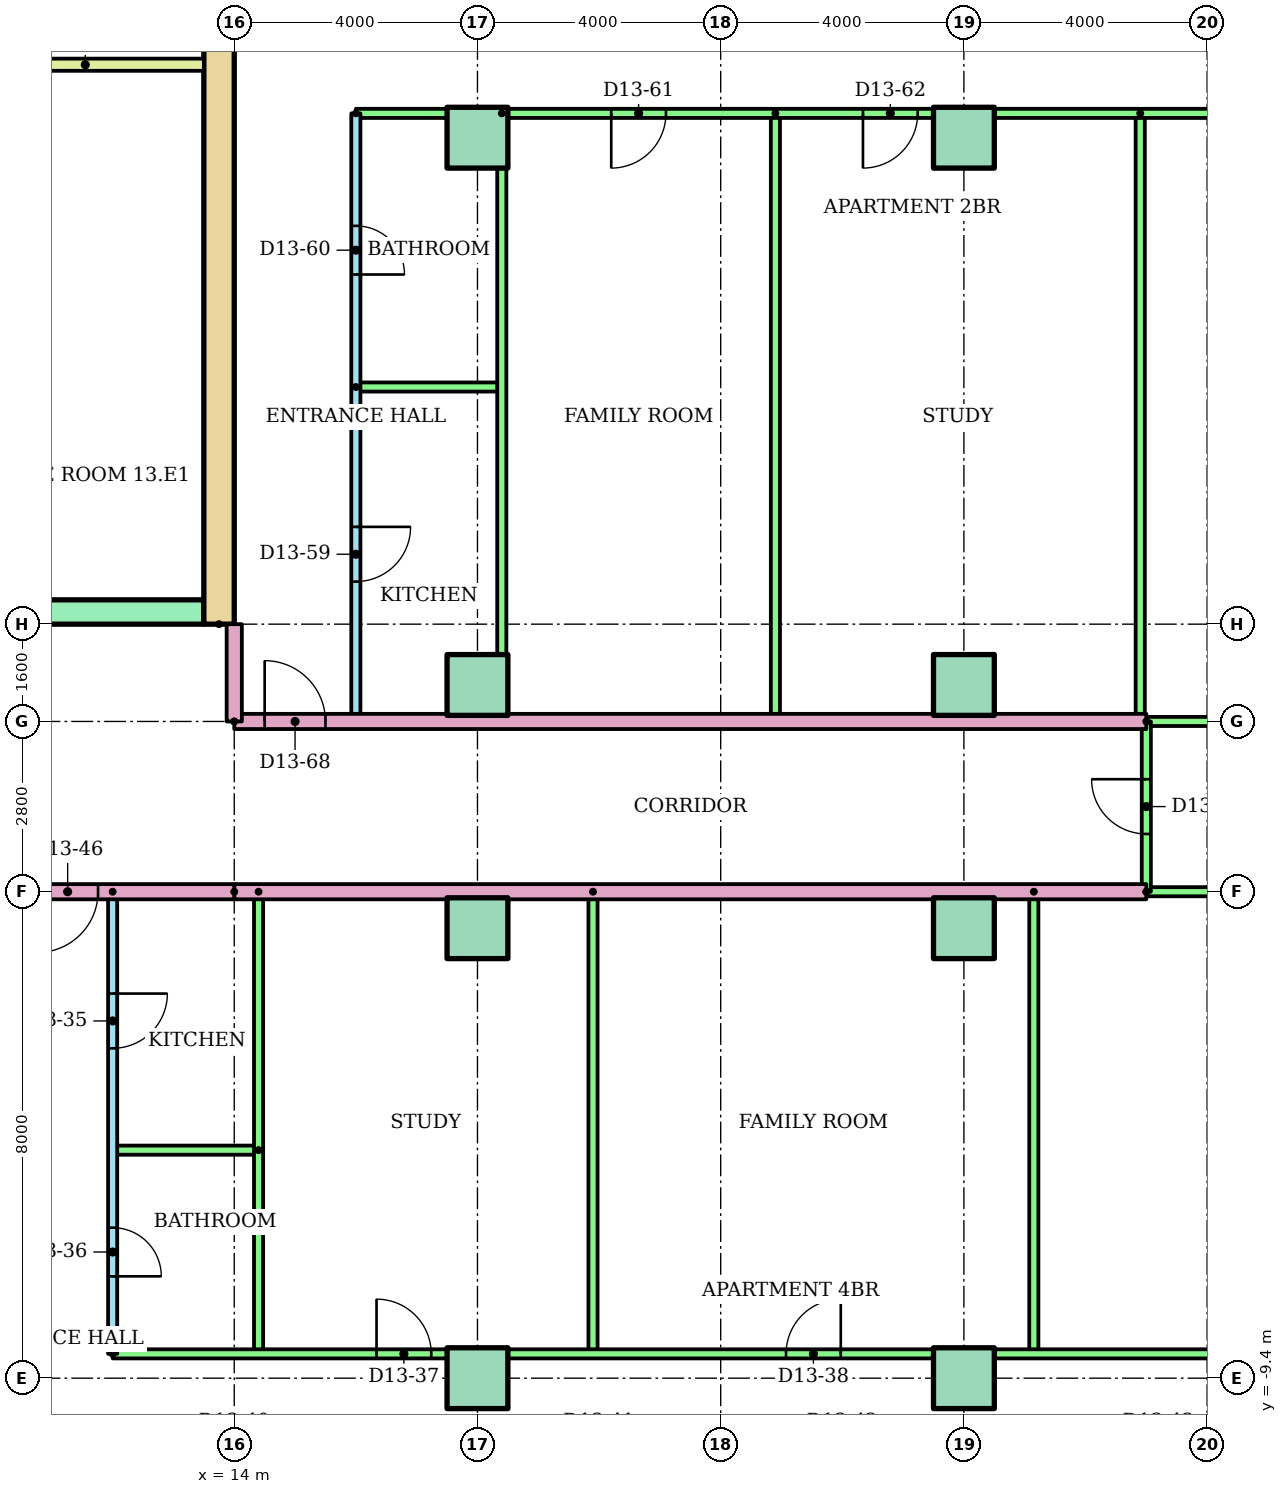
"""IFC4 building model, lengths in metres.
Left out: names, types, materials, properties, quantities, classifications, styles, units other than length and angle.
Written with IfcOpenShell. Run it as: python <this file> out.ifc"""

import sys

from ifc_helpers import new_model, si_unit, direction, frame, frame_2d, origin, origin_2d, place, context, subcontext, project, spatial, rectangle, extrude, element, fill, save


model = new_model("IFC4")
c1 = context("Model", 3, precision=1e-05, world=origin(), true_north=direction((0.0, 1.0)))
c2 = subcontext(c1, "Body", "Model", "MODEL_VIEW")
j1 = project(units=[si_unit("LENGTHUNIT", "METRE"), si_unit("PLANEANGLEUNIT", "RADIAN")], contexts=[c1])
p1 = place(None, origin())
s1 = spatial("IfcSite", under=j1, at=p1, CompositionType="ELEMENT")
p2 = place(p1, origin())
s2 = spatial("IfcBuilding", under=s1, at=p2, CompositionType="ELEMENT")
p3 = place(p2, frame((0.0, 0.0, 51.2)))
s3 = spatial("IfcBuildingStorey", under=s2, at=p3, CompositionType="ELEMENT", Elevation=51.2)
for number, where in (
    (1, (18.0, -9.4, 0.0)),
    (2, (26.0, -9.4, 0.0)),
    (3, (18.0, -2.0, 0.0)),
    (4, (26.0, -2.0, 0.0)),
    (5, (18.0, 2.0, 0.0)),
    (6, (26.0, 2.0, 0.0)),
    (7, (18.0, 11.0, 0.0)),
    (8, (26.0, 11.0, 0.0)),
):
    element("IfcColumn", number, at=place(p3, frame(where)), inside=s3, PredefinedType="COLUMN", context=c2, shape_type="SweptSolid", body=[
        extrude(rectangle(XDim=1.0, YDim=1.0, at=origin_2d()), origin(), (0.0, 0.0, 1.0), 3.2),
    ])
p4 = place(p3, frame((13.75, 3.0, 0.0), z_axis=(0.0, 0.0, 1.0), x_axis=(0.0, 1.0, 0.0)))
e9 = element("IfcWall", 9, at=p4, inside=s3, PredefinedType="SHEAR", context=c2, shape_type="SweptSolid", body=[
    extrude(rectangle(XDim=17.0, YDim=0.5, at=frame_2d((8.5, 0.0))), origin(), (0.0, 0.0, 1.0), 2.92),
])
p5 = place(p3, frame((-13.5, 3.2, 0.0)))
e10 = element("IfcWall", 10, at=p5, inside=s3, PredefinedType="SHEAR", context=c2, shape_type="SweptSolid", body=[
    extrude(rectangle(XDim=27.0, YDim=0.4, at=frame_2d((13.5, 0.0))), origin(), (0.0, 0.0, 1.0), 2.92),
])
p6 = place(p5, frame((6.861, 0.0, 0.0)))
e11 = element("IfcOpeningElement", 11, at=p6, cuts=e10, PredefinedType="OPENING", context=c2, shape_type="SweptSolid", body=[
    extrude(rectangle(XDim=1.1, YDim=2.1, at=frame_2d((0.55, 1.05))), frame((0.0, 0.21, 0.0), z_axis=(0.0, -1.0, 0.0), x_axis=(1.0, 0.0, 0.0)), (0.0, 0.0, 1.0), 0.42),
])
p7 = place(p5, frame((9.906, 0.0, 0.0)))
e12 = element("IfcOpeningElement", 12, at=p7, cuts=e10, PredefinedType="OPENING", context=c2, shape_type="SweptSolid", body=[
    extrude(rectangle(XDim=1.1, YDim=2.1, at=frame_2d((0.55, 1.05))), frame((0.0, 0.21, 0.0), z_axis=(0.0, -1.0, 0.0), x_axis=(1.0, 0.0, 0.0)), (0.0, 0.0, 1.0), 0.42),
])
p8 = place(p5, frame((15.994, 0.0, 0.0)))
e13 = element("IfcOpeningElement", 13, at=p8, cuts=e10, PredefinedType="OPENING", context=c2, shape_type="SweptSolid", body=[
    extrude(rectangle(XDim=1.1, YDim=2.1, at=frame_2d((0.55, 1.05))), frame((0.0, 0.21, 0.0), z_axis=(0.0, -1.0, 0.0), x_axis=(1.0, 0.0, 0.0)), (0.0, 0.0, 1.0), 0.42),
])
p9 = place(p5, frame((19.039, 0.0, 0.0)))
e14 = element("IfcOpeningElement", 14, at=p9, cuts=e10, PredefinedType="OPENING", context=c2, shape_type="SweptSolid", body=[
    extrude(rectangle(XDim=1.1, YDim=2.1, at=frame_2d((0.55, 1.05))), frame((0.0, 0.21, 0.0), z_axis=(0.0, -1.0, 0.0), x_axis=(1.0, 0.0, 0.0)), (0.0, 0.0, 1.0), 0.42),
])
p10 = place(p5, frame((12.6, 0.0, 0.0)))
e15 = element("IfcOpeningElement", 15, at=p10, cuts=e10, PredefinedType="OPENING", context=c2, shape_type="SweptSolid", body=[
    extrude(rectangle(XDim=1.8, YDim=2.1, at=frame_2d((0.9, 1.05))), frame((0.0, 0.21, 0.0), z_axis=(0.0, -1.0, 0.0), x_axis=(1.0, 0.0, 0.0)), (0.0, 0.0, 1.0), 0.42),
])
p11 = place(p3, frame((9.6, 12.2, 0.0)))
e16 = element("IfcWall", 16, at=p11, inside=s3, PredefinedType="PARTITIONING", context=c2, shape_type="SweptSolid", body=[
    extrude(rectangle(XDim=3.9, YDim=0.2, at=frame_2d((1.95, 0.0))), origin(), (0.0, 0.0, 1.0), 2.92),
])
p12 = place(p3, frame((12.0, -1.4, 0.0), z_axis=(0.0, 0.0, 1.0), x_axis=(0.0, -1.0, 0.0)))
e17 = element("IfcWall", 17, at=p12, inside=s3, PredefinedType="PARTITIONING", context=c2, shape_type="SweptSolid", body=[
    extrude(rectangle(XDim=7.6, YDim=0.15, at=frame_2d((3.8, 0.0))), origin(), (0.0, 0.0, 1.0), 2.4),
])
p13 = place(p12, frame((1.675, 0.0, 0.0)))
e18 = element("IfcOpeningElement", 18, at=p13, cuts=e17, PredefinedType="OPENING", context=c2, shape_type="SweptSolid", body=[
    extrude(rectangle(XDim=0.9, YDim=2.1, at=frame_2d((0.45, 1.05))), frame((0.0, 0.085, 0.0), z_axis=(0.0, -1.0, 0.0), x_axis=(1.0, 0.0, 0.0)), (0.0, 0.0, 1.0), 0.17),
])
p14 = place(p12, frame((5.525, 0.0, 0.0)))
e19 = element("IfcOpeningElement", 19, at=p14, cuts=e17, PredefinedType="OPENING", context=c2, shape_type="SweptSolid", body=[
    extrude(rectangle(XDim=0.8, YDim=2.1, at=frame_2d((0.4, 1.05))), frame((0.0, 0.085, 0.0), z_axis=(0.0, -1.0, 0.0), x_axis=(1.0, 0.0, 0.0)), (0.0, 0.0, 1.0), 0.17),
])
p15 = place(p3, frame((14.4, -5.65, 0.0), z_axis=(0.0, 0.0, 1.0), x_axis=(-1.0, 0.0, 0.0)))
e20 = element("IfcWall", 20, at=p15, inside=s3, PredefinedType="PARTITIONING", context=c2, shape_type="SweptSolid", body=[
    extrude(rectangle(XDim=2.4, YDim=0.15, at=frame_2d((1.2, 0.0))), origin(), (0.0, 0.0, 1.0), 2.4),
])
for number, where, z_axis, x_axis in (
    (21, (14.4, -1.4, 0.0), (0.0, 0.0, 1.0), (0.0, -1.0, 0.0)),
    (22, (19.9, -1.4, 0.0), (0.0, 0.0, 1.0), (0.0, -1.0, 0.0)),
    (23, (27.15, -1.4, 0.0), (0.0, 0.0, 1.0), (0.0, -1.0, 0.0)),
):
    element("IfcWall", number, at=place(p3, frame(where, z_axis=z_axis, x_axis=x_axis)), inside=s3, PredefinedType="PARTITIONING", context=c2, shape_type="SweptSolid", body=[
        extrude(rectangle(XDim=7.6, YDim=0.15, at=frame_2d((3.8, 0.0))), origin(), (0.0, 0.0, 1.0), 2.4),
    ])
p16 = place(p3, frame((12.0, -9.0, 0.0)))
e24 = element("IfcWall", 24, at=p16, inside=s3, PredefinedType="PARTITIONING", context=c2, shape_type="SweptSolid", body=[
    extrude(rectangle(XDim=24.52, YDim=0.15, at=frame_2d((12.26, 0.0))), origin(), (0.0, 0.0, 1.0), 2.4),
])
p17 = place(p16, frame((4.34, 0.0, 0.0)))
e25 = element("IfcOpeningElement", 25, at=p17, cuts=e24, PredefinedType="OPENING", context=c2, shape_type="SweptSolid", body=[
    extrude(rectangle(XDim=0.9, YDim=2.1, at=frame_2d((0.45, 1.05))), frame((0.0, 0.085, 0.0), z_axis=(0.0, -1.0, 0.0), x_axis=(1.0, 0.0, 0.0)), (0.0, 0.0, 1.0), 0.17),
])
p18 = place(p16, frame((11.075, 0.0, 0.0)))
e26 = element("IfcOpeningElement", 26, at=p18, cuts=e24, PredefinedType="OPENING", context=c2, shape_type="SweptSolid", body=[
    extrude(rectangle(XDim=0.9, YDim=2.1, at=frame_2d((0.45, 1.05))), frame((0.0, 0.085, 0.0), z_axis=(0.0, -1.0, 0.0), x_axis=(1.0, 0.0, 0.0)), (0.0, 0.0, 1.0), 0.17),
])
p19 = place(p16, frame((19.275, 0.0, 0.0)))
e27 = element("IfcOpeningElement", 27, at=p19, cuts=e24, PredefinedType="OPENING", context=c2, shape_type="SweptSolid", body=[
    extrude(rectangle(XDim=0.9, YDim=2.1, at=frame_2d((0.45, 1.05))), frame((0.0, 0.085, 0.0), z_axis=(0.0, -1.0, 0.0), x_axis=(1.0, 0.0, 0.0)), (0.0, 0.0, 1.0), 0.17),
])
p20 = place(p3, frame((29.0, -1.4, 0.0), z_axis=(0.0, 0.0, 1.0), x_axis=(-1.0, 0.0, 0.0)))
e28 = element("IfcWall", 28, at=p20, inside=s3, PredefinedType="PARTITIONING", context=c2, shape_type="SweptSolid", body=[
    extrude(rectangle(XDim=15.0, YDim=0.25, at=frame_2d((7.5, 0.0))), origin(), (0.0, 0.0, 1.0), 2.4),
])
p21 = place(p3, frame((36.52, -1.4, 0.0), z_axis=(0.0, 0.0, 1.0), x_axis=(-1.0, 0.0, 0.0)))
e29 = element("IfcWall", 29, at=p21, inside=s3, PredefinedType="PARTITIONING", context=c2, shape_type="SweptSolid", body=[
    extrude(rectangle(XDim=7.52, YDim=0.15, at=frame_2d((3.76, 0.0))), origin(), (0.0, 0.0, 1.0), 2.4),
])
p22 = place(p3, frame((16.0, 11.4, 0.0), z_axis=(0.0, 0.0, 1.0), x_axis=(0.0, -1.0, 0.0)))
e30 = element("IfcWall", 30, at=p22, inside=s3, PredefinedType="PARTITIONING", context=c2, shape_type="SweptSolid", body=[
    extrude(rectangle(XDim=10.0, YDim=0.15, at=frame_2d((5.0, 0.0))), origin(), (0.0, 0.0, 1.0), 2.4),
])
p23 = place(p22, frame((6.8, 0.0, 0.0)))
e31 = element("IfcOpeningElement", 31, at=p23, cuts=e30, PredefinedType="OPENING", context=c2, shape_type="SweptSolid", body=[
    extrude(rectangle(XDim=0.9, YDim=2.1, at=frame_2d((0.45, 1.05))), frame((0.0, 0.085, 0.0), z_axis=(0.0, -1.0, 0.0), x_axis=(1.0, 0.0, 0.0)), (0.0, 0.0, 1.0), 0.17),
])
p24 = place(p22, frame((1.85, 0.0, 0.0)))
e32 = element("IfcOpeningElement", 32, at=p24, cuts=e30, PredefinedType="OPENING", context=c2, shape_type="SweptSolid", body=[
    extrude(rectangle(XDim=0.8, YDim=2.1, at=frame_2d((0.4, 1.05))), frame((0.0, 0.085, 0.0), z_axis=(0.0, -1.0, 0.0), x_axis=(1.0, 0.0, 0.0)), (0.0, 0.0, 1.0), 0.17),
])
p25 = place(p3, frame((16.0, 6.9, 0.0)))
e33 = element("IfcWall", 33, at=p25, inside=s3, PredefinedType="PARTITIONING", context=c2, shape_type="SweptSolid", body=[
    extrude(rectangle(XDim=2.4, YDim=0.15, at=frame_2d((1.2, 0.0))), origin(), (0.0, 0.0, 1.0), 2.4),
])
for number, where, z_axis, x_axis in (
    (34, (18.4, 11.4, 0.0), (0.0, 0.0, 1.0), (0.0, -1.0, 0.0)),
    (35, (22.9, 11.4, 0.0), (0.0, 0.0, 1.0), (0.0, -1.0, 0.0)),
    (36, (28.9, 11.4, 0.0), (0.0, 0.0, 1.0), (0.0, -1.0, 0.0)),
):
    element("IfcWall", number, at=place(p3, frame(where, z_axis=z_axis, x_axis=x_axis)), inside=s3, PredefinedType="PARTITIONING", context=c2, shape_type="SweptSolid", body=[
        extrude(rectangle(XDim=10.0, YDim=0.15, at=frame_2d((5.0, 0.0))), origin(), (0.0, 0.0, 1.0), 2.4),
    ])
p26 = place(p3, frame((36.52, 11.4, 0.0), z_axis=(0.0, 0.0, 1.0), x_axis=(-1.0, 0.0, 0.0)))
e37 = element("IfcWall", 37, at=p26, inside=s3, PredefinedType="PARTITIONING", context=c2, shape_type="SweptSolid", body=[
    extrude(rectangle(XDim=20.52, YDim=0.15, at=frame_2d((10.26, 0.0))), origin(), (0.0, 0.0, 1.0), 2.4),
])
p27 = place(p26, frame((15.42, 0.0, 0.0)))
e38 = element("IfcOpeningElement", 38, at=p27, cuts=e37, PredefinedType="OPENING", context=c2, shape_type="SweptSolid", body=[
    extrude(rectangle(XDim=0.9, YDim=2.1, at=frame_2d((0.45, 1.05))), frame((0.0, 0.085, 0.0), z_axis=(0.0, -1.0, 0.0), x_axis=(1.0, 0.0, 0.0)), (0.0, 0.0, 1.0), 0.17),
])
p28 = place(p26, frame((11.28, 0.0, 0.0)))
e39 = element("IfcOpeningElement", 39, at=p28, cuts=e37, PredefinedType="OPENING", context=c2, shape_type="SweptSolid", body=[
    extrude(rectangle(XDim=0.9, YDim=2.1, at=frame_2d((0.45, 1.05))), frame((0.0, 0.085, 0.0), z_axis=(0.0, -1.0, 0.0), x_axis=(1.0, 0.0, 0.0)), (0.0, 0.0, 1.0), 0.17),
])
p29 = place(p26, frame((3.47, 0.0, 0.0)))
e40 = element("IfcOpeningElement", 40, at=p29, cuts=e37, PredefinedType="OPENING", context=c2, shape_type="SweptSolid", body=[
    extrude(rectangle(XDim=0.9, YDim=2.1, at=frame_2d((0.45, 1.05))), frame((0.0, 0.085, 0.0), z_axis=(0.0, -1.0, 0.0), x_axis=(1.0, 0.0, 0.0)), (0.0, 0.0, 1.0), 0.17),
])
p30 = place(p3, frame((14.0, 1.4, 0.0)))
e41 = element("IfcWall", 41, at=p30, inside=s3, PredefinedType="PARTITIONING", context=c2, shape_type="SweptSolid", body=[
    extrude(rectangle(XDim=15.0, YDim=0.25, at=frame_2d((7.5, 0.0))), origin(), (0.0, 0.0, 1.0), 2.4),
])
p31 = place(p30, frame((0.5, 0.0, 0.0)))
e42 = element("IfcOpeningElement", 42, at=p31, cuts=e41, PredefinedType="OPENING", context=c2, shape_type="SweptSolid", body=[
    extrude(rectangle(XDim=1.0, YDim=2.1, at=frame_2d((0.5, 1.05))), frame((0.0, 0.135, 0.0), z_axis=(0.0, -1.0, 0.0), x_axis=(1.0, 0.0, 0.0)), (0.0, 0.0, 1.0), 0.27),
])
p32 = place(p3, frame((29.0, 1.4, 0.0)))
e43 = element("IfcWall", 43, at=p32, inside=s3, PredefinedType="PARTITIONING", context=c2, shape_type="SweptSolid", body=[
    extrude(rectangle(XDim=7.52, YDim=0.15, at=frame_2d((3.76, 0.0))), origin(), (0.0, 0.0, 1.0), 2.4),
])
p33 = place(p3, frame((29.0, -1.4, 0.0), z_axis=(0.0, 0.0, 1.0), x_axis=(0.0, 1.0, 0.0)))
e44 = element("IfcWall", 44, at=p33, inside=s3, PredefinedType="PARTITIONING", context=c2, shape_type="SweptSolid", body=[
    extrude(rectangle(XDim=2.8, YDim=0.15, at=frame_2d((1.4, 0.0))), origin(), (0.0, 0.0, 1.0), 2.4),
])
p34 = place(p33, frame((0.95, 0.0, 0.0)))
e45 = element("IfcOpeningElement", 45, at=p34, cuts=e44, PredefinedType="OPENING", context=c2, shape_type="SweptSolid", body=[
    extrude(rectangle(XDim=0.9, YDim=2.1, at=frame_2d((0.45, 1.05))), frame((0.0, 0.085, 0.0), z_axis=(0.0, -1.0, 0.0), x_axis=(1.0, 0.0, 0.0)), (0.0, 0.0, 1.0), 0.17),
])
p35 = place(p3, frame((14.0, -1.4, 0.0), z_axis=(0.0, 0.0, 1.0), x_axis=(-1.0, 0.0, 0.0)))
e46 = element("IfcWall", 46, at=p35, inside=s3, PredefinedType="PARTITIONING", context=c2, shape_type="SweptSolid", body=[
    extrude(rectangle(XDim=28.0, YDim=0.25, at=frame_2d((14.0, 0.0))), origin(), (0.0, 0.0, 1.0), 2.4),
])
p36 = place(p35, frame((4.76, 0.0, 0.0)))
e47 = element("IfcOpeningElement", 47, at=p36, cuts=e46, PredefinedType="OPENING", context=c2, shape_type="SweptSolid", body=[
    extrude(rectangle(XDim=1.0, YDim=2.1, at=frame_2d((0.5, 1.05))), frame((0.0, 0.135, 0.0), z_axis=(0.0, -1.0, 0.0), x_axis=(1.0, 0.0, 0.0)), (0.0, 0.0, 1.0), 0.27),
])
p37 = place(p35, frame((2.24, 0.0, 0.0)))
e48 = element("IfcOpeningElement", 48, at=p37, cuts=e46, PredefinedType="OPENING", context=c2, shape_type="SweptSolid", body=[
    extrude(rectangle(XDim=1.0, YDim=2.1, at=frame_2d((0.5, 1.05))), frame((0.0, 0.135, 0.0), z_axis=(0.0, -1.0, 0.0), x_axis=(1.0, 0.0, 0.0)), (0.0, 0.0, 1.0), 0.27),
])
p38 = place(p3, frame((14.0, 1.4, 0.0), z_axis=(0.0, 0.0, 1.0), x_axis=(0.0, 1.0, 0.0)))
e49 = element("IfcWall", 49, at=p38, inside=s3, PredefinedType="PARTITIONING", context=c2, shape_type="SweptSolid", body=[
    extrude(rectangle(XDim=1.6, YDim=0.25, at=frame_2d((0.8, 0.0))), origin(), (0.0, 0.0, 1.0), 2.4),
])
p39 = place(p13, origin())
e50 = element("IfcDoor", 50, at=p39, inside=s3, OperationType="SINGLE_SWING_LEFT", PredefinedType="DOOR", context=c2, shape_type="SweptSolid", body=[
    extrude(rectangle(XDim=0.9, YDim=2.1, at=frame_2d((0.45, 1.05))), frame((0.0, 0.025, 0.0), z_axis=(0.0, -1.0, 0.0), x_axis=(1.0, 0.0, 0.0)), (0.0, 0.0, 1.0), 0.05),
])
fill(e18, e50)
p40 = place(p14, origin())
e51 = element("IfcDoor", 51, at=p40, inside=s3, OperationType="SINGLE_SWING_RIGHT", PredefinedType="DOOR", context=c2, shape_type="SweptSolid", body=[
    extrude(rectangle(XDim=0.8, YDim=2.1, at=frame_2d((0.4, 1.05))), frame((0.0, 0.025, 0.0), z_axis=(0.0, -1.0, 0.0), x_axis=(1.0, 0.0, 0.0)), (0.0, 0.0, 1.0), 0.05),
])
fill(e19, e51)
p41 = place(p17, origin())
e52 = element("IfcDoor", 52, at=p41, inside=s3, OperationType="SINGLE_SWING_LEFT", PredefinedType="DOOR", context=c2, shape_type="SweptSolid", body=[
    extrude(rectangle(XDim=0.9, YDim=2.1, at=frame_2d((0.45, 1.05))), frame((0.0, 0.025, 0.0), z_axis=(0.0, -1.0, 0.0), x_axis=(1.0, 0.0, 0.0)), (0.0, 0.0, 1.0), 0.05),
])
fill(e25, e52)
p42 = place(p18, origin())
e53 = element("IfcDoor", 53, at=p42, inside=s3, OperationType="SINGLE_SWING_RIGHT", PredefinedType="DOOR", context=c2, shape_type="SweptSolid", body=[
    extrude(rectangle(XDim=0.9, YDim=2.1, at=frame_2d((0.45, 1.05))), frame((0.0, 0.025, 0.0), z_axis=(0.0, -1.0, 0.0), x_axis=(1.0, 0.0, 0.0)), (0.0, 0.0, 1.0), 0.05),
])
fill(e26, e53)
p43 = place(p37, origin())
e54 = element("IfcDoor", 54, at=p43, inside=s3, OperationType="SINGLE_SWING_RIGHT", PredefinedType="DOOR", context=c2, shape_type="SweptSolid", body=[
    extrude(rectangle(XDim=1.0, YDim=2.1, at=frame_2d((0.5, 1.05))), frame((0.0, 0.025, 0.0), z_axis=(0.0, -1.0, 0.0), x_axis=(1.0, 0.0, 0.0)), (0.0, 0.0, 1.0), 0.05),
])
fill(e48, e54)
p44 = place(p23, origin())
e55 = element("IfcDoor", 55, at=p44, inside=s3, OperationType="SINGLE_SWING_LEFT", PredefinedType="DOOR", context=c2, shape_type="SweptSolid", body=[
    extrude(rectangle(XDim=0.9, YDim=2.1, at=frame_2d((0.45, 1.05))), frame((0.0, 0.025, 0.0), z_axis=(0.0, -1.0, 0.0), x_axis=(1.0, 0.0, 0.0)), (0.0, 0.0, 1.0), 0.05),
])
fill(e31, e55)
p45 = place(p24, origin())
e56 = element("IfcDoor", 56, at=p45, inside=s3, OperationType="SINGLE_SWING_RIGHT", PredefinedType="DOOR", context=c2, shape_type="SweptSolid", body=[
    extrude(rectangle(XDim=0.8, YDim=2.1, at=frame_2d((0.4, 1.05))), frame((0.0, 0.025, 0.0), z_axis=(0.0, -1.0, 0.0), x_axis=(1.0, 0.0, 0.0)), (0.0, 0.0, 1.0), 0.05),
])
fill(e32, e56)
p46 = place(p27, origin())
e57 = element("IfcDoor", 57, at=p46, inside=s3, OperationType="SINGLE_SWING_RIGHT", PredefinedType="DOOR", context=c2, shape_type="SweptSolid", body=[
    extrude(rectangle(XDim=0.9, YDim=2.1, at=frame_2d((0.45, 1.05))), frame((0.0, 0.025, 0.0), z_axis=(0.0, -1.0, 0.0), x_axis=(1.0, 0.0, 0.0)), (0.0, 0.0, 1.0), 0.05),
])
fill(e38, e57)
p47 = place(p28, origin())
e58 = element("IfcDoor", 58, at=p47, inside=s3, OperationType="SINGLE_SWING_RIGHT", PredefinedType="DOOR", context=c2, shape_type="SweptSolid", body=[
    extrude(rectangle(XDim=0.9, YDim=2.1, at=frame_2d((0.45, 1.05))), frame((0.0, 0.025, 0.0), z_axis=(0.0, -1.0, 0.0), x_axis=(1.0, 0.0, 0.0)), (0.0, 0.0, 1.0), 0.05),
])
fill(e39, e58)
p48 = place(p31, origin())
e59 = element("IfcDoor", 59, at=p48, inside=s3, OperationType="SINGLE_SWING_LEFT", PredefinedType="DOOR", context=c2, shape_type="SweptSolid", body=[
    extrude(rectangle(XDim=1.0, YDim=2.1, at=frame_2d((0.5, 1.05))), frame((0.0, 0.025, 0.0), z_axis=(0.0, -1.0, 0.0), x_axis=(1.0, 0.0, 0.0)), (0.0, 0.0, 1.0), 0.05),
])
fill(e42, e59)
p49 = place(p34, origin())
e60 = element("IfcDoor", 60, at=p49, inside=s3, OperationType="SINGLE_SWING_RIGHT", PredefinedType="DOOR", context=c2, shape_type="SweptSolid", body=[
    extrude(rectangle(XDim=0.9, YDim=2.1, at=frame_2d((0.45, 1.05))), frame((0.0, 0.025, 0.0), z_axis=(0.0, -1.0, 0.0), x_axis=(1.0, 0.0, 0.0)), (0.0, 0.0, 1.0), 0.05),
])
fill(e45, e60)
save(model, sys.argv[1])
